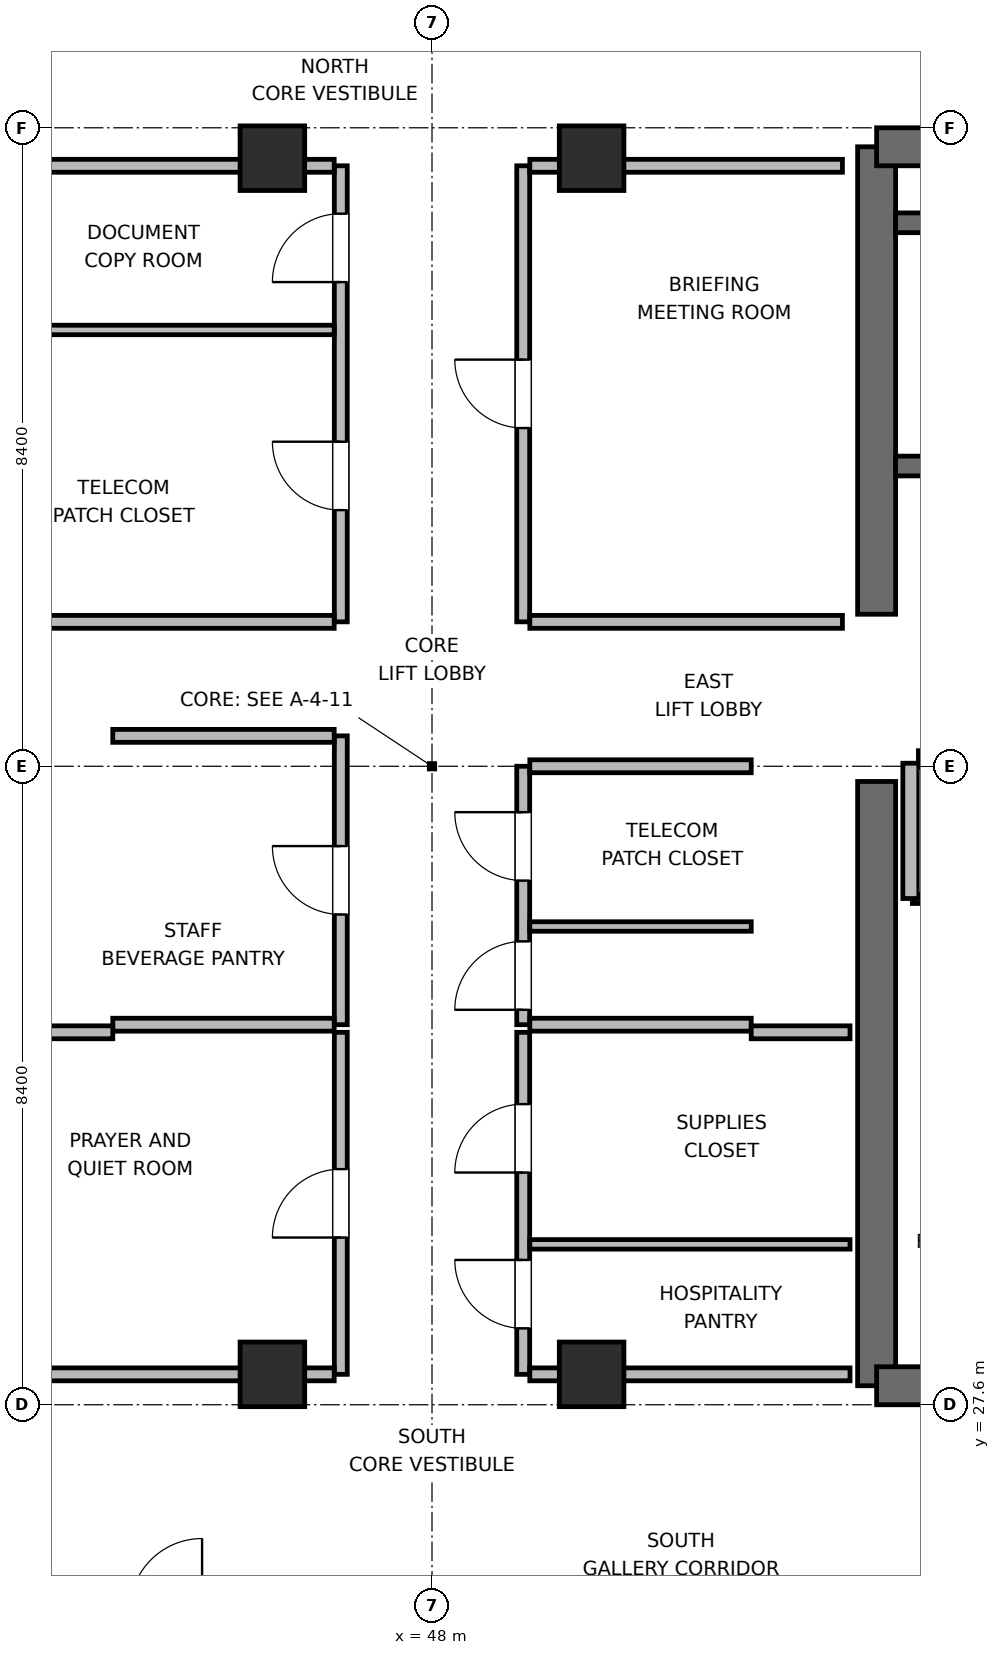
"""IFC4 building model, lengths in metres.
Left out: names, types, materials, properties, quantities, classifications, styles, units other than length and angle.
Written with IfcOpenShell. Run it as: python <this file> out.ifc"""

import sys

from ifc_helpers import new_model, si_unit, direction, frame, frame_2d, origin, origin_2d, place, context, subcontext, project, spatial, rectangle, extrude, element, fill, save


model = new_model("IFC4")
c1 = context("Model", 3, precision=1e-05, world=origin(), true_north=direction((0.0, 1.0)))
c2 = subcontext(c1, "Body", "Model", "MODEL_VIEW")
j1 = project(units=[si_unit("LENGTHUNIT", "METRE"), si_unit("PLANEANGLEUNIT", "RADIAN")], contexts=[c1])
p1 = place(None, origin())
s1 = spatial("IfcSite", under=j1, at=p1, CompositionType="ELEMENT")
p2 = place(p1, origin())
s2 = spatial("IfcBuilding", under=s1, at=p2, CompositionType="ELEMENT")
p3 = place(p2, frame((0.0, 0.0, 262.8)))
s3 = spatial("IfcBuildingStorey", under=s2, at=p3, CompositionType="ELEMENT", Elevation=262.8)
p4 = place(p3, frame((53.85, 27.85, 0.0), z_axis=(0.0, 0.0, 1.0), x_axis=(0.0, 1.0, 0.0)))
e1 = element("IfcWall", 1, at=p4, inside=s3, PredefinedType="SHEAR", context=c2, shape_type="SweptSolid", body=[
    extrude(rectangle(XDim=7.95, YDim=0.5, at=frame_2d((3.975, 0.0))), origin(), (0.0, 0.0, 1.0), 3.9),
])
p5 = place(p3, frame((53.85, 38.0, 0.0), z_axis=(0.0, 0.0, 1.0), x_axis=(0.0, 1.0, 0.0)))
e2 = element("IfcWall", 2, at=p5, inside=s3, PredefinedType="SHEAR", context=c2, shape_type="SweptSolid", body=[
    extrude(rectangle(XDim=6.15, YDim=0.5, at=frame_2d((3.075, 0.0))), origin(), (0.0, 0.0, 1.0), 3.9),
])
p6 = place(p3, frame((53.85, 27.85, 0.0), z_axis=(0.0, 0.0, 1.0), x_axis=(1.0, 0.0, 0.0)))
e3 = element("IfcWall", 3, at=p6, inside=s3, PredefinedType="SHEAR", context=c2, shape_type="SweptSolid", body=[
    extrude(rectangle(XDim=9.5, YDim=0.5, at=frame_2d((4.75, 0.0))), origin(), (0.0, 0.0, 1.0), 3.9),
])
p7 = place(p6, frame((4.025, 0.0, 0.0)))
e4 = element("IfcOpeningElement", 4, at=p7, cuts=e3, PredefinedType="OPENING", context=c2, shape_type="SweptSolid", body=[
    extrude(rectangle(XDim=1.05, YDim=2.04, at=frame_2d((0.525, 1.02))), frame((0.0, 0.26, 0.0), z_axis=(0.0, -1.0, 0.0), x_axis=(1.0, 0.0, 0.0)), (0.0, 0.0, 1.0), 0.52),
])
p8 = place(p3, frame((53.85, 44.15, 0.0), z_axis=(0.0, 0.0, 1.0), x_axis=(1.0, 0.0, 0.0)))
e5 = element("IfcWall", 5, at=p8, inside=s3, PredefinedType="SHEAR", context=c2, shape_type="SweptSolid", body=[
    extrude(rectangle(XDim=9.5, YDim=0.5, at=frame_2d((4.75, 0.0))), origin(), (0.0, 0.0, 1.0), 3.9),
])
p9 = place(p3, frame((54.1, 39.95, 0.0), z_axis=(0.0, 0.0, 1.0), x_axis=(1.0, 0.0, 0.0)))
e6 = element("IfcWall", 6, at=p9, inside=s3, PredefinedType="SHEAR", context=c2, shape_type="SweptSolid", body=[
    extrude(rectangle(XDim=9.0, YDim=0.26, at=frame_2d((4.5, 0.0))), origin(), (0.0, 0.0, 1.0), 3.9),
])
p10 = place(p9, frame((1.1, 0.0, 0.0)))
e7 = element("IfcOpeningElement", 7, at=p10, cuts=e6, PredefinedType="OPENING", context=c2, shape_type="SweptSolid", body=[
    extrude(rectangle(XDim=1.0, YDim=2.04, at=frame_2d((0.5, 1.02))), frame((0.0, 0.14, 0.0), z_axis=(0.0, -1.0, 0.0), x_axis=(1.0, 0.0, 0.0)), (0.0, 0.0, 1.0), 0.28),
])
p11 = place(p3, frame((54.1, 43.15, 0.0), z_axis=(0.0, 0.0, 1.0), x_axis=(1.0, 0.0, 0.0)))
e8 = element("IfcWall", 8, at=p11, inside=s3, PredefinedType="SHEAR", context=c2, shape_type="SweptSolid", body=[
    extrude(rectangle(XDim=9.0, YDim=0.26, at=frame_2d((4.5, 0.0))), origin(), (0.0, 0.0, 1.0), 3.9),
])
for number, where, z_axis, x_axis in (
    (9, (45.9, 28.0, 0.0), (0.0, 0.0, 1.0), (1.0, 0.0, 0.0)),
    (10, (50.1, 28.0, 0.0), (0.0, 0.0, 1.0), (1.0, 0.0, 0.0)),
    (11, (45.9, 44.0, 0.0), (0.0, 0.0, 1.0), (1.0, 0.0, 0.0)),
    (12, (50.1, 44.0, 0.0), (0.0, 0.0, 1.0), (1.0, 0.0, 0.0)),
):
    element("IfcColumn", number, at=place(p3, frame(where, z_axis=z_axis, x_axis=x_axis)), inside=s3, PredefinedType="COLUMN", context=c2, shape_type="SweptSolid", body=[
        extrude(rectangle(XDim=0.85, YDim=0.85, at=origin_2d()), origin(), (0.0, 0.0, 1.0), 3.9),
    ])
p12 = place(p3, frame((54.32, 34.3, 0.0), z_axis=(0.0, 0.0, 1.0), x_axis=(1.0, 0.0, 0.0)))
e13 = element("IfcWall", 13, at=p12, inside=s3, PredefinedType="PARTITIONING", context=c2, shape_type="SweptSolid", body=[
    extrude(rectangle(XDim=3.48, YDim=0.21, at=frame_2d((1.74, 0.0))), origin(), (0.0, 0.0, 1.0), 3.68),
])
p13 = place(p3, frame((54.4, 36.1, 0.0), z_axis=(0.0, 0.0, 1.0), x_axis=(1.0, 0.0, 0.0)))
e14 = element("IfcWall", 14, at=p13, inside=s3, PredefinedType="PARTITIONING", context=c2, shape_type="SweptSolid", body=[
    extrude(rectangle(XDim=2.1, YDim=0.21, at=frame_2d((1.05, 0.0))), origin(), (0.0, 0.0, 1.0), 3.68),
])
p14 = place(p13, frame((0.5, 0.0, 0.0)))
e15 = element("IfcOpeningElement", 15, at=p14, cuts=e14, PredefinedType="OPENING", context=c2, shape_type="SweptSolid", body=[
    extrude(rectangle(XDim=1.1, YDim=2.04, at=frame_2d((0.55, 1.02))), frame((0.0, 0.115, 0.0), z_axis=(0.0, -1.0, 0.0), x_axis=(1.0, 0.0, 0.0)), (0.0, 0.0, 1.0), 0.23),
])
p15 = place(p3, frame((54.3, 34.26, 0.0), z_axis=(0.0, 0.0, 1.0), x_axis=(0.0, 1.0, 0.0)))
e16 = element("IfcWall", 16, at=p15, inside=s3, PredefinedType="PARTITIONING", context=c2, shape_type="SweptSolid", body=[
    extrude(rectangle(XDim=1.78, YDim=0.21, at=frame_2d((0.89, 0.0))), origin(), (0.0, 0.0, 1.0), 3.68),
])
p16 = place(p3, frame((46.8, 32.6, 0.0), z_axis=(0.0, 0.0, 1.0), x_axis=(0.0, 1.0, 0.0)))
e17 = element("IfcWall", 17, at=p16, inside=s3, PredefinedType="PARTITIONING", context=c2, shape_type="SweptSolid", body=[
    extrude(rectangle(XDim=3.8, YDim=0.17, at=frame_2d((1.9, 0.0))), origin(), (0.0, 0.0, 1.0), 3.68),
])
p17 = place(p16, frame((1.45, 0.0, 0.0)))
e18 = element("IfcOpeningElement", 18, at=p17, cuts=e17, PredefinedType="OPENING", context=c2, shape_type="SweptSolid", body=[
    extrude(rectangle(XDim=0.9, YDim=2.02, at=frame_2d((0.45, 1.01))), frame((0.0, 0.095, 0.0), z_axis=(0.0, -1.0, 0.0), x_axis=(1.0, 0.0, 0.0)), (0.0, 0.0, 1.0), 0.19),
])
for number, where, z_axis, x_axis in (
    (19, (43.8, 32.6, 0.0), (0.0, 0.0, 1.0), (1.0, 0.0, 0.0)),
    (20, (43.8, 36.4, 0.0), (0.0, 0.0, 1.0), (1.0, 0.0, 0.0)),
):
    element("IfcWall", number, at=place(p3, frame(where, z_axis=z_axis, x_axis=x_axis)), inside=s3, PredefinedType="PARTITIONING", context=c2, shape_type="SweptSolid", body=[
        extrude(rectangle(XDim=2.913, YDim=0.17, at=frame_2d((1.457, 0.0))), origin(), (0.0, 0.0, 1.0), 3.68),
    ])
p18 = place(p3, frame((49.2, 32.6, 0.0), z_axis=(0.0, 0.0, 1.0), x_axis=(0.0, 1.0, 0.0)))
e21 = element("IfcWall", 21, at=p18, inside=s3, PredefinedType="PARTITIONING", context=c2, shape_type="SweptSolid", body=[
    extrude(rectangle(XDim=3.4, YDim=0.17, at=frame_2d((1.7, 0.0))), origin(), (0.0, 0.0, 1.0), 3.68),
])
p19 = place(p18, frame((0.196, 0.0, 0.0)))
e22 = element("IfcOpeningElement", 22, at=p19, cuts=e21, PredefinedType="OPENING", context=c2, shape_type="SweptSolid", body=[
    extrude(rectangle(XDim=0.9, YDim=2.02, at=frame_2d((0.45, 1.01))), frame((0.0, 0.095, 0.0), z_axis=(0.0, -1.0, 0.0), x_axis=(1.0, 0.0, 0.0)), (0.0, 0.0, 1.0), 0.19),
])
p20 = place(p18, frame((1.896, 0.0, 0.0)))
e23 = element("IfcOpeningElement", 23, at=p20, cuts=e21, PredefinedType="OPENING", context=c2, shape_type="SweptSolid", body=[
    extrude(rectangle(XDim=0.9, YDim=2.02, at=frame_2d((0.45, 1.01))), frame((0.0, 0.095, 0.0), z_axis=(0.0, -1.0, 0.0), x_axis=(1.0, 0.0, 0.0)), (0.0, 0.0, 1.0), 0.19),
])
for number, where, z_axis, x_axis in (
    (24, (49.287, 32.6, 0.0), (0.0, 0.0, 1.0), (1.0, 0.0, 0.0)),
    (25, (49.287, 36.0, 0.0), (0.0, 0.0, 1.0), (1.0, 0.0, 0.0)),
):
    element("IfcWall", number, at=place(p3, frame(where, z_axis=z_axis, x_axis=x_axis)), inside=s3, PredefinedType="PARTITIONING", context=c2, shape_type="SweptSolid", body=[
        extrude(rectangle(XDim=2.913, YDim=0.17, at=frame_2d((1.457, 0.0))), origin(), (0.0, 0.0, 1.0), 3.68),
    ])
p21 = place(p3, frame((49.287, 33.892, 0.0), z_axis=(0.0, 0.0, 1.0), x_axis=(1.0, 0.0, 0.0)))
e26 = element("IfcWall", 26, at=p21, inside=s3, PredefinedType="PARTITIONING", context=c2, shape_type="SweptSolid", body=[
    extrude(rectangle(XDim=2.913, YDim=0.125, at=frame_2d((1.457, 0.0))), origin(), (0.0, 0.0, 1.0), 3.68),
])
p22 = place(p3, frame((46.8, 28.0, 0.0), z_axis=(0.0, 0.0, 1.0), x_axis=(0.0, 1.0, 0.0)))
e27 = element("IfcWall", 27, at=p22, inside=s3, PredefinedType="PARTITIONING", context=c2, shape_type="SweptSolid", body=[
    extrude(rectangle(XDim=4.5, YDim=0.17, at=frame_2d((2.25, 0.0))), origin(), (0.0, 0.0, 1.0), 3.68),
])
p23 = place(p22, frame((1.8, 0.0, 0.0)))
e28 = element("IfcOpeningElement", 28, at=p23, cuts=e27, PredefinedType="OPENING", context=c2, shape_type="SweptSolid", body=[
    extrude(rectangle(XDim=0.9, YDim=2.02, at=frame_2d((0.45, 1.01))), frame((0.0, 0.095, 0.0), z_axis=(0.0, -1.0, 0.0), x_axis=(1.0, 0.0, 0.0)), (0.0, 0.0, 1.0), 0.19),
])
p24 = place(p3, frame((42.5, 28.0, 0.0), z_axis=(0.0, 0.0, 1.0), x_axis=(1.0, 0.0, 0.0)))
e29 = element("IfcWall", 29, at=p24, inside=s3, PredefinedType="PARTITIONING", context=c2, shape_type="SweptSolid", body=[
    extrude(rectangle(XDim=4.213, YDim=0.17, at=frame_2d((2.106, 0.0))), origin(), (0.0, 0.0, 1.0), 2.765),
])
p25 = place(p3, frame((42.5, 32.5, 0.0), z_axis=(0.0, 0.0, 1.0), x_axis=(1.0, 0.0, 0.0)))
e30 = element("IfcWall", 30, at=p25, inside=s3, PredefinedType="PARTITIONING", context=c2, shape_type="SweptSolid", body=[
    extrude(rectangle(XDim=1.3, YDim=0.17, at=frame_2d((0.65, 0.0))), origin(), (0.0, 0.0, 1.0), 3.68),
])
p26 = place(p3, frame((49.2, 28.0, 0.0), z_axis=(0.0, 0.0, 1.0), x_axis=(0.0, 1.0, 0.0)))
e31 = element("IfcWall", 31, at=p26, inside=s3, PredefinedType="PARTITIONING", context=c2, shape_type="SweptSolid", body=[
    extrude(rectangle(XDim=4.5, YDim=0.17, at=frame_2d((2.25, 0.0))), origin(), (0.0, 0.0, 1.0), 3.68),
])
p27 = place(p26, frame((0.605, 0.0, 0.0)))
e32 = element("IfcOpeningElement", 32, at=p27, cuts=e31, PredefinedType="OPENING", context=c2, shape_type="SweptSolid", body=[
    extrude(rectangle(XDim=0.9, YDim=2.02, at=frame_2d((0.45, 1.01))), frame((0.0, 0.095, 0.0), z_axis=(0.0, -1.0, 0.0), x_axis=(1.0, 0.0, 0.0)), (0.0, 0.0, 1.0), 0.19),
])
p28 = place(p26, frame((2.655, 0.0, 0.0)))
e33 = element("IfcOpeningElement", 33, at=p28, cuts=e31, PredefinedType="OPENING", context=c2, shape_type="SweptSolid", body=[
    extrude(rectangle(XDim=0.9, YDim=2.02, at=frame_2d((0.45, 1.01))), frame((0.0, 0.095, 0.0), z_axis=(0.0, -1.0, 0.0), x_axis=(1.0, 0.0, 0.0)), (0.0, 0.0, 1.0), 0.19),
])
p29 = place(p3, frame((49.287, 28.0, 0.0), z_axis=(0.0, 0.0, 1.0), x_axis=(1.0, 0.0, 0.0)))
e34 = element("IfcWall", 34, at=p29, inside=s3, PredefinedType="PARTITIONING", context=c2, shape_type="SweptSolid", body=[
    extrude(rectangle(XDim=4.213, YDim=0.17, at=frame_2d((2.106, 0.0))), origin(), (0.0, 0.0, 1.0), 2.765),
])
p30 = place(p3, frame((52.2, 32.5, 0.0), z_axis=(0.0, 0.0, 1.0), x_axis=(1.0, 0.0, 0.0)))
e35 = element("IfcWall", 35, at=p30, inside=s3, PredefinedType="PARTITIONING", context=c2, shape_type="SweptSolid", body=[
    extrude(rectangle(XDim=1.3, YDim=0.17, at=frame_2d((0.65, 0.0))), origin(), (0.0, 0.0, 1.0), 3.68),
])
p31 = place(p3, frame((49.287, 29.71, 0.0), z_axis=(0.0, 0.0, 1.0), x_axis=(1.0, 0.0, 0.0)))
e36 = element("IfcWall", 36, at=p31, inside=s3, PredefinedType="PARTITIONING", context=c2, shape_type="SweptSolid", body=[
    extrude(rectangle(XDim=4.213, YDim=0.125, at=frame_2d((2.106, 0.0))), origin(), (0.0, 0.0, 1.0), 3.68),
])
p32 = place(p3, frame((46.8, 37.9, 0.0), z_axis=(0.0, 0.0, 1.0), x_axis=(0.0, 1.0, 0.0)))
e37 = element("IfcWall", 37, at=p32, inside=s3, PredefinedType="PARTITIONING", context=c2, shape_type="SweptSolid", body=[
    extrude(rectangle(XDim=6.0, YDim=0.17, at=frame_2d((3.0, 0.0))), origin(), (0.0, 0.0, 1.0), 3.68),
])
p33 = place(p32, frame((1.47, 0.0, 0.0)))
e38 = element("IfcOpeningElement", 38, at=p33, cuts=e37, PredefinedType="OPENING", context=c2, shape_type="SweptSolid", body=[
    extrude(rectangle(XDim=0.9, YDim=2.02, at=frame_2d((0.45, 1.01))), frame((0.0, 0.095, 0.0), z_axis=(0.0, -1.0, 0.0), x_axis=(1.0, 0.0, 0.0)), (0.0, 0.0, 1.0), 0.19),
])
p34 = place(p32, frame((4.47, 0.0, 0.0)))
e39 = element("IfcOpeningElement", 39, at=p34, cuts=e37, PredefinedType="OPENING", context=c2, shape_type="SweptSolid", body=[
    extrude(rectangle(XDim=0.9, YDim=2.02, at=frame_2d((0.45, 1.01))), frame((0.0, 0.095, 0.0), z_axis=(0.0, -1.0, 0.0), x_axis=(1.0, 0.0, 0.0)), (0.0, 0.0, 1.0), 0.19),
])
p35 = place(p3, frame((42.5, 37.9, 0.0), z_axis=(0.0, 0.0, 1.0), x_axis=(1.0, 0.0, 0.0)))
e40 = element("IfcWall", 40, at=p35, inside=s3, PredefinedType="PARTITIONING", context=c2, shape_type="SweptSolid", body=[
    extrude(rectangle(XDim=4.213, YDim=0.17, at=frame_2d((2.106, 0.0))), origin(), (0.0, 0.0, 1.0), 3.68),
])
p36 = place(p3, frame((42.5, 43.9, 0.0), z_axis=(0.0, 0.0, 1.0), x_axis=(1.0, 0.0, 0.0)))
e41 = element("IfcWall", 41, at=p36, inside=s3, PredefinedType="PARTITIONING", context=c2, shape_type="SweptSolid", body=[
    extrude(rectangle(XDim=4.213, YDim=0.17, at=frame_2d((2.106, 0.0))), origin(), (0.0, 0.0, 1.0), 2.765),
])
p37 = place(p3, frame((42.5, 41.74, 0.0), z_axis=(0.0, 0.0, 1.0), x_axis=(1.0, 0.0, 0.0)))
e42 = element("IfcWall", 42, at=p37, inside=s3, PredefinedType="PARTITIONING", context=c2, shape_type="SweptSolid", body=[
    extrude(rectangle(XDim=4.213, YDim=0.125, at=frame_2d((2.106, 0.0))), origin(), (0.0, 0.0, 1.0), 3.68),
])
p38 = place(p3, frame((49.2, 37.9, 0.0), z_axis=(0.0, 0.0, 1.0), x_axis=(0.0, 1.0, 0.0)))
e43 = element("IfcWall", 43, at=p38, inside=s3, PredefinedType="PARTITIONING", context=c2, shape_type="SweptSolid", body=[
    extrude(rectangle(XDim=6.0, YDim=0.17, at=frame_2d((3.0, 0.0))), origin(), (0.0, 0.0, 1.0), 3.68),
])
p39 = place(p38, frame((2.55, 0.0, 0.0)))
e44 = element("IfcOpeningElement", 44, at=p39, cuts=e43, PredefinedType="OPENING", context=c2, shape_type="SweptSolid", body=[
    extrude(rectangle(XDim=0.9, YDim=2.02, at=frame_2d((0.45, 1.01))), frame((0.0, 0.095, 0.0), z_axis=(0.0, -1.0, 0.0), x_axis=(1.0, 0.0, 0.0)), (0.0, 0.0, 1.0), 0.19),
])
p40 = place(p3, frame((49.287, 37.9, 0.0), z_axis=(0.0, 0.0, 1.0), x_axis=(1.0, 0.0, 0.0)))
e45 = element("IfcWall", 45, at=p40, inside=s3, PredefinedType="PARTITIONING", context=c2, shape_type="SweptSolid", body=[
    extrude(rectangle(XDim=4.113, YDim=0.17, at=frame_2d((2.056, 0.0))), origin(), (0.0, 0.0, 1.0), 3.68),
])
p41 = place(p3, frame((49.287, 43.9, 0.0), z_axis=(0.0, 0.0, 1.0), x_axis=(1.0, 0.0, 0.0)))
e46 = element("IfcWall", 46, at=p41, inside=s3, PredefinedType="PARTITIONING", context=c2, shape_type="SweptSolid", body=[
    extrude(rectangle(XDim=4.113, YDim=0.17, at=frame_2d((2.056, 0.0))), origin(), (0.0, 0.0, 1.0), 2.765),
])
p42 = place(p17, origin())
e47 = element("IfcDoor", 47, at=p42, inside=s3, OperationType="SINGLE_SWING_RIGHT", PredefinedType="DOOR", context=c2, shape_type="SweptSolid", body=[
    extrude(rectangle(XDim=0.9, YDim=2.02, at=frame_2d((0.45, 1.01))), frame((0.0, 0.025, 0.0), z_axis=(0.0, -1.0, 0.0), x_axis=(1.0, 0.0, 0.0)), (0.0, 0.0, 1.0), 0.05),
])
fill(e18, e47)
p43 = place(p19, origin())
e48 = element("IfcDoor", 48, at=p43, inside=s3, OperationType="SINGLE_SWING_LEFT", PredefinedType="DOOR", context=c2, shape_type="SweptSolid", body=[
    extrude(rectangle(XDim=0.9, YDim=2.02, at=frame_2d((0.45, 1.01))), frame((0.0, 0.025, 0.0), z_axis=(0.0, -1.0, 0.0), x_axis=(1.0, 0.0, 0.0)), (0.0, 0.0, 1.0), 0.05),
])
fill(e22, e48)
p44 = place(p20, origin())
e49 = element("IfcDoor", 49, at=p44, inside=s3, OperationType="SINGLE_SWING_RIGHT", PredefinedType="DOOR", context=c2, shape_type="SweptSolid", body=[
    extrude(rectangle(XDim=0.9, YDim=2.02, at=frame_2d((0.45, 1.01))), frame((0.0, 0.025, 0.0), z_axis=(0.0, -1.0, 0.0), x_axis=(1.0, 0.0, 0.0)), (0.0, 0.0, 1.0), 0.05),
])
fill(e23, e49)
p45 = place(p23, origin())
e50 = element("IfcDoor", 50, at=p45, inside=s3, OperationType="SINGLE_SWING_LEFT", PredefinedType="DOOR", context=c2, shape_type="SweptSolid", body=[
    extrude(rectangle(XDim=0.9, YDim=2.02, at=frame_2d((0.45, 1.01))), frame((0.0, 0.025, 0.0), z_axis=(0.0, -1.0, 0.0), x_axis=(1.0, 0.0, 0.0)), (0.0, 0.0, 1.0), 0.05),
])
fill(e28, e50)
p46 = place(p27, origin())
e51 = element("IfcDoor", 51, at=p46, inside=s3, OperationType="SINGLE_SWING_RIGHT", PredefinedType="DOOR", context=c2, shape_type="SweptSolid", body=[
    extrude(rectangle(XDim=0.9, YDim=2.02, at=frame_2d((0.45, 1.01))), frame((0.0, 0.025, 0.0), z_axis=(0.0, -1.0, 0.0), x_axis=(1.0, 0.0, 0.0)), (0.0, 0.0, 1.0), 0.05),
])
fill(e32, e51)
p47 = place(p28, origin())
e52 = element("IfcDoor", 52, at=p47, inside=s3, OperationType="SINGLE_SWING_LEFT", PredefinedType="DOOR", context=c2, shape_type="SweptSolid", body=[
    extrude(rectangle(XDim=0.9, YDim=2.02, at=frame_2d((0.45, 1.01))), frame((0.0, 0.025, 0.0), z_axis=(0.0, -1.0, 0.0), x_axis=(1.0, 0.0, 0.0)), (0.0, 0.0, 1.0), 0.05),
])
fill(e33, e52)
p48 = place(p33, origin())
e53 = element("IfcDoor", 53, at=p48, inside=s3, OperationType="SINGLE_SWING_RIGHT", PredefinedType="DOOR", context=c2, shape_type="SweptSolid", body=[
    extrude(rectangle(XDim=0.9, YDim=2.02, at=frame_2d((0.45, 1.01))), frame((0.0, 0.025, 0.0), z_axis=(0.0, -1.0, 0.0), x_axis=(1.0, 0.0, 0.0)), (0.0, 0.0, 1.0), 0.05),
])
fill(e38, e53)
p49 = place(p34, origin())
e54 = element("IfcDoor", 54, at=p49, inside=s3, OperationType="SINGLE_SWING_LEFT", PredefinedType="DOOR", context=c2, shape_type="SweptSolid", body=[
    extrude(rectangle(XDim=0.9, YDim=2.02, at=frame_2d((0.45, 1.01))), frame((0.0, 0.025, 0.0), z_axis=(0.0, -1.0, 0.0), x_axis=(1.0, 0.0, 0.0)), (0.0, 0.0, 1.0), 0.05),
])
fill(e39, e54)
p50 = place(p39, origin())
e55 = element("IfcDoor", 55, at=p50, inside=s3, OperationType="SINGLE_SWING_RIGHT", PredefinedType="DOOR", context=c2, shape_type="SweptSolid", body=[
    extrude(rectangle(XDim=0.9, YDim=2.02, at=frame_2d((0.45, 1.01))), frame((0.0, 0.025, 0.0), z_axis=(0.0, -1.0, 0.0), x_axis=(1.0, 0.0, 0.0)), (0.0, 0.0, 1.0), 0.05),
])
fill(e44, e55)
save(model, sys.argv[1])
